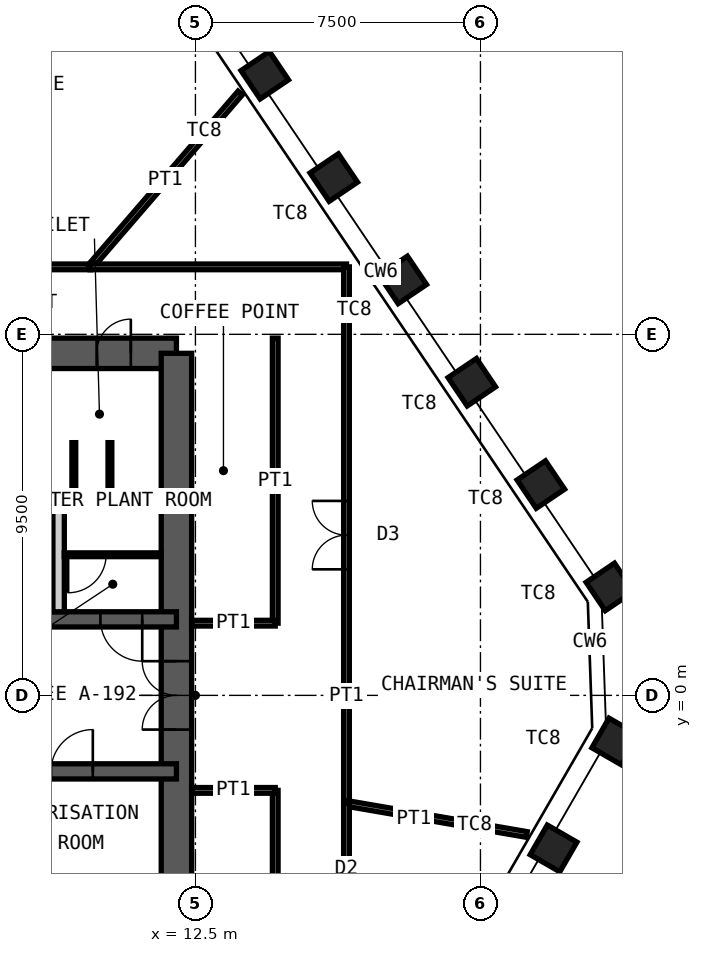
"""IFC4 building model, lengths in metres.
Left out: names, types, materials, properties, quantities, classifications, styles, units other than length and angle.
Written with IfcOpenShell. Run it as: python <this file> out.ifc"""

import sys

from ifc_helpers import new_model, si_unit, direction, frame, frame_2d, origin, origin_2d, place, context, subcontext, project, spatial, rectangle, hollow_rectangle, extrude, element, fill, save


model = new_model("IFC4")
c1 = context("Model", 3, precision=1e-05, world=origin(), true_north=direction((0.0, 1.0)))
c2 = subcontext(c1, "Body", "Model", "MODEL_VIEW")
j1 = project(units=[si_unit("LENGTHUNIT", "METRE"), si_unit("PLANEANGLEUNIT", "RADIAN")], contexts=[c1])
p1 = place(None, origin())
s1 = spatial("IfcSite", under=j1, at=p1, CompositionType="ELEMENT")
p2 = place(p1, origin())
s2 = spatial("IfcBuilding", under=s1, at=p2, CompositionType="ELEMENT")
p3 = place(p2, frame((0.0, 0.0, 333.4)))
s3 = spatial("IfcBuildingStorey", under=s2, at=p3, CompositionType="ELEMENT", Elevation=333.4)
for number, where, z_axis, x_axis in (
    (1, (14.324, 16.318, 0.0), (0.0, 0.0, 1.0), (-0.559, 0.829, 0.0)),
    (2, (16.141, 13.625, 0.0), (0.0, 0.0, 1.0), (-0.559, 0.829, 0.0)),
    (3, (17.957, 10.932, 0.0), (0.0, 0.0, 1.0), (-0.559, 0.829, 0.0)),
    (4, (19.773, 8.239, 0.0), (0.0, 0.0, 1.0), (-0.559, 0.829, 0.0)),
    (5, (21.589, 5.547, 0.0), (0.0, 0.0, 1.0), (-0.559, 0.829, 0.0)),
    (6, (23.406, 2.854, 0.0), (0.0, 0.0, 1.0), (-0.559, 0.829, 0.0)),
    (7, (23.548, -1.214, 0.0), (0.0, 0.0, 1.0), (0.5, 0.866, 0.0)),
    (8, (21.924, -4.027, 0.0), (0.0, 0.0, 1.0), (0.5, 0.866, 0.0)),
):
    element("IfcColumn", number, at=place(p3, frame(where, z_axis=z_axis, x_axis=x_axis)), inside=s3, PredefinedType="COLUMN", context=c2, shape_type="SweptSolid", body=[
        extrude(hollow_rectangle(XDim=0.9, YDim=0.9, WallThickness=0.05, at=origin_2d()), origin(), (0.0, 0.0, 1.0), 4.2),
    ])
p4 = place(p3, frame((-12.0, 9.0, 0.0), z_axis=(0.0, 0.0, 1.0), x_axis=(1.0, 0.0, 0.0)))
e9 = element("IfcWall", 9, at=p4, inside=s3, PredefinedType="SHEAR", context=c2, shape_type="SweptSolid", body=[
    extrude(rectangle(XDim=24.0, YDim=0.8, at=frame_2d((12.0, 0.0))), origin(), (0.0, 0.0, 1.0), 4.2),
])
p5 = place(p4, frame((10.4, 0.0, 0.0)))
e10 = element("IfcOpeningElement", 10, at=p5, cuts=e9, PredefinedType="OPENING", context=c2, shape_type="SweptSolid", body=[
    extrude(rectangle(XDim=1.0, YDim=2.1, at=frame_2d((0.5, 1.05))), frame((0.0, 0.41, 0.0), z_axis=(0.0, -1.0, 0.0), x_axis=(1.0, 0.0, 0.0)), (0.0, 0.0, 1.0), 0.82),
])
p6 = place(p4, frame((17.6, 0.0, 0.0)))
e11 = element("IfcOpeningElement", 11, at=p6, cuts=e9, PredefinedType="OPENING", context=c2, shape_type="SweptSolid", body=[
    extrude(rectangle(XDim=0.9, YDim=2.1, at=frame_2d((0.45, 1.05))), frame((0.0, 0.41, 0.0), z_axis=(0.0, -1.0, 0.0), x_axis=(1.0, 0.0, 0.0)), (0.0, 0.0, 1.0), 0.82),
])
p7 = place(p4, frame((21.9, 0.0, 0.0)))
e12 = element("IfcOpeningElement", 12, at=p7, cuts=e9, PredefinedType="OPENING", context=c2, shape_type="SweptSolid", body=[
    extrude(rectangle(XDim=0.9, YDim=2.1, at=frame_2d((0.45, 1.05))), frame((0.0, 0.41, 0.0), z_axis=(0.0, -1.0, 0.0), x_axis=(1.0, 0.0, 0.0)), (0.0, 0.0, 1.0), 0.82),
])
p8 = place(p3, frame((12.0, -9.0, 0.0), z_axis=(0.0, 0.0, 1.0), x_axis=(0.0, 1.0, 0.0)))
e13 = element("IfcWall", 13, at=p8, inside=s3, PredefinedType="SHEAR", context=c2, shape_type="SweptSolid", body=[
    extrude(rectangle(XDim=18.0, YDim=0.8, at=frame_2d((9.0, 0.0))), origin(), (0.0, 0.0, 1.0), 4.2),
])
p9 = place(p8, frame((8.1, 0.0, 0.0)))
e14 = element("IfcOpeningElement", 14, at=p9, cuts=e13, PredefinedType="OPENING", context=c2, shape_type="SweptSolid", body=[
    extrude(rectangle(XDim=1.8, YDim=2.1, at=frame_2d((0.9, 1.05))), frame((0.0, 0.41, 0.0), z_axis=(0.0, -1.0, 0.0), x_axis=(1.0, 0.0, 0.0)), (0.0, 0.0, 1.0), 0.82),
])
p10 = place(p3, frame((-12.0, 5.0, 0.0), z_axis=(0.0, 0.0, 1.0), x_axis=(1.0, 0.0, 0.0)))
e15 = element("IfcWall", 15, at=p10, inside=s3, PredefinedType="SHEAR", context=c2, shape_type="SweptSolid", body=[
    extrude(rectangle(XDim=24.0, YDim=0.3, at=frame_2d((12.0, 0.0))), origin(), (0.0, 0.0, 1.0), 4.2),
])
p11 = place(p3, frame((-12.0, 2.0, 0.0), z_axis=(0.0, 0.0, 1.0), x_axis=(1.0, 0.0, 0.0)))
e16 = element("IfcWall", 16, at=p11, inside=s3, PredefinedType="SHEAR", context=c2, shape_type="SweptSolid", body=[
    extrude(rectangle(XDim=24.0, YDim=0.4, at=frame_2d((12.0, 0.0))), origin(), (0.0, 0.0, 1.0), 4.2),
])
p12 = place(p11, frame((2.4, 0.0, 0.0)))
e17 = element("IfcOpeningElement", 17, at=p12, cuts=e16, PredefinedType="OPENING", context=c2, shape_type="SweptSolid", body=[
    extrude(rectangle(XDim=1.1, YDim=2.1, at=frame_2d((0.55, 1.05))), frame((0.0, 0.21, 0.0), z_axis=(0.0, -1.0, 0.0), x_axis=(1.0, 0.0, 0.0)), (0.0, 0.0, 1.0), 0.42),
])
p13 = place(p11, frame((22.0, 0.0, 0.0)))
e18 = element("IfcOpeningElement", 18, at=p13, cuts=e16, PredefinedType="OPENING", context=c2, shape_type="SweptSolid", body=[
    extrude(rectangle(XDim=1.1, YDim=2.1, at=frame_2d((0.55, 1.05))), frame((0.0, 0.21, 0.0), z_axis=(0.0, -1.0, 0.0), x_axis=(1.0, 0.0, 0.0)), (0.0, 0.0, 1.0), 0.42),
])
p14 = place(p11, frame((10.15, 0.0, 0.0)))
e19 = element("IfcOpeningElement", 19, at=p14, cuts=e16, PredefinedType="OPENING", context=c2, shape_type="SweptSolid", body=[
    extrude(rectangle(XDim=1.0, YDim=2.1, at=frame_2d((0.5, 1.05))), frame((0.0, 0.21, 0.0), z_axis=(0.0, -1.0, 0.0), x_axis=(1.0, 0.0, 0.0)), (0.0, 0.0, 1.0), 0.42),
])
p15 = place(p11, frame((6.9, 0.0, 0.0)))
e20 = element("IfcOpeningElement", 20, at=p15, cuts=e16, PredefinedType="OPENING", context=c2, shape_type="SweptSolid", body=[
    extrude(rectangle(XDim=1.0, YDim=2.1, at=frame_2d((0.5, 1.05))), frame((0.0, 0.21, 0.0), z_axis=(0.0, -1.0, 0.0), x_axis=(1.0, 0.0, 0.0)), (0.0, 0.0, 1.0), 0.42),
])
p16 = place(p11, frame((13.35, 0.0, 0.0)))
e21 = element("IfcOpeningElement", 21, at=p16, cuts=e16, PredefinedType="OPENING", context=c2, shape_type="SweptSolid", body=[
    extrude(rectangle(XDim=1.1, YDim=2.4, at=frame_2d((0.55, 1.2))), frame((0.0, 0.21, 0.0), z_axis=(0.0, -1.0, 0.0), x_axis=(1.0, 0.0, 0.0)), (0.0, 0.0, 1.0), 0.42),
])
p17 = place(p11, frame((16.15, 0.0, 0.0)))
e22 = element("IfcOpeningElement", 22, at=p17, cuts=e16, PredefinedType="OPENING", context=c2, shape_type="SweptSolid", body=[
    extrude(rectangle(XDim=1.1, YDim=2.4, at=frame_2d((0.55, 1.2))), frame((0.0, 0.21, 0.0), z_axis=(0.0, -1.0, 0.0), x_axis=(1.0, 0.0, 0.0)), (0.0, 0.0, 1.0), 0.42),
])
p18 = place(p11, frame((19.0, 0.0, 0.0)))
e23 = element("IfcOpeningElement", 23, at=p18, cuts=e16, PredefinedType="OPENING", context=c2, shape_type="SweptSolid", body=[
    extrude(rectangle(XDim=1.0, YDim=2.1, at=frame_2d((0.5, 1.05))), frame((0.0, 0.21, 0.0), z_axis=(0.0, -1.0, 0.0), x_axis=(1.0, 0.0, 0.0)), (0.0, 0.0, 1.0), 0.42),
])
p19 = place(p3, frame((-12.0, -2.0, 0.0), z_axis=(0.0, 0.0, 1.0), x_axis=(1.0, 0.0, 0.0)))
e24 = element("IfcWall", 24, at=p19, inside=s3, PredefinedType="SHEAR", context=c2, shape_type="SweptSolid", body=[
    extrude(rectangle(XDim=24.0, YDim=0.4, at=frame_2d((12.0, 0.0))), origin(), (0.0, 0.0, 1.0), 4.2),
])
p20 = place(p19, frame((1.1, 0.0, 0.0)))
e25 = element("IfcOpeningElement", 25, at=p20, cuts=e24, PredefinedType="OPENING", context=c2, shape_type="SweptSolid", body=[
    extrude(rectangle(XDim=1.1, YDim=2.1, at=frame_2d((0.55, 1.05))), frame((0.0, 0.21, 0.0), z_axis=(0.0, -1.0, 0.0), x_axis=(1.0, 0.0, 0.0)), (0.0, 0.0, 1.0), 0.42),
])
p21 = place(p19, frame((13.55, 0.0, 0.0)))
e26 = element("IfcOpeningElement", 26, at=p21, cuts=e24, PredefinedType="OPENING", context=c2, shape_type="SweptSolid", body=[
    extrude(rectangle(XDim=1.1, YDim=2.1, at=frame_2d((0.55, 1.05))), frame((0.0, 0.21, 0.0), z_axis=(0.0, -1.0, 0.0), x_axis=(1.0, 0.0, 0.0)), (0.0, 0.0, 1.0), 0.42),
])
p22 = place(p19, frame((20.7, 0.0, 0.0)))
e27 = element("IfcOpeningElement", 27, at=p22, cuts=e24, PredefinedType="OPENING", context=c2, shape_type="SweptSolid", body=[
    extrude(rectangle(XDim=1.1, YDim=2.1, at=frame_2d((0.55, 1.05))), frame((0.0, 0.21, 0.0), z_axis=(0.0, -1.0, 0.0), x_axis=(1.0, 0.0, 0.0)), (0.0, 0.0, 1.0), 0.42),
])
p23 = place(p19, frame((4.0, 0.0, 0.0)))
e28 = element("IfcOpeningElement", 28, at=p23, cuts=e24, PredefinedType="OPENING", context=c2, shape_type="SweptSolid", body=[
    extrude(rectangle(XDim=1.0, YDim=2.1, at=frame_2d((0.5, 1.05))), frame((0.0, 0.21, 0.0), z_axis=(0.0, -1.0, 0.0), x_axis=(1.0, 0.0, 0.0)), (0.0, 0.0, 1.0), 0.42),
])
p24 = place(p19, frame((6.8, 0.0, 0.0)))
e29 = element("IfcOpeningElement", 29, at=p24, cuts=e24, PredefinedType="OPENING", context=c2, shape_type="SweptSolid", body=[
    extrude(rectangle(XDim=1.0, YDim=2.1, at=frame_2d((0.5, 1.05))), frame((0.0, 0.21, 0.0), z_axis=(0.0, -1.0, 0.0), x_axis=(1.0, 0.0, 0.0)), (0.0, 0.0, 1.0), 0.42),
])
p25 = place(p19, frame((9.6, 0.0, 0.0)))
e30 = element("IfcOpeningElement", 30, at=p25, cuts=e24, PredefinedType="OPENING", context=c2, shape_type="SweptSolid", body=[
    extrude(rectangle(XDim=1.0, YDim=2.1, at=frame_2d((0.5, 1.05))), frame((0.0, 0.21, 0.0), z_axis=(0.0, -1.0, 0.0), x_axis=(1.0, 0.0, 0.0)), (0.0, 0.0, 1.0), 0.42),
])
p26 = place(p3, frame((8.9, 2.2, 0.0), z_axis=(0.0, 0.0, 1.0), x_axis=(0.0, 1.0, 0.0)))
e31 = element("IfcWall", 31, at=p26, inside=s3, PredefinedType="PARTITIONING", context=c2, shape_type="SweptSolid", body=[
    extrude(rectangle(XDim=2.65, YDim=0.3, at=frame_2d((1.325, 0.0))), origin(), (0.0, 0.0, 1.0), 3.98),
])
p27 = place(p3, frame((9.05, 3.7, 0.0), z_axis=(0.0, 0.0, 1.0), x_axis=(1.0, 0.0, 0.0)))
e32 = element("IfcWall", 32, at=p27, inside=s3, PredefinedType="PARTITIONING", context=c2, shape_type="SweptSolid", body=[
    extrude(rectangle(XDim=2.55, YDim=0.1, at=frame_2d((1.275, 0.0))), origin(), (0.0, 0.0, 1.0), 3.98),
])
p28 = place(p27, frame((0.1, 0.0, 0.0)))
e33 = element("IfcOpeningElement", 33, at=p28, cuts=e32, PredefinedType="OPENING", context=c2, shape_type="SweptSolid", body=[
    extrude(rectangle(XDim=1.0, YDim=2.4, at=frame_2d((0.5, 1.2))), frame((0.0, 0.06, 0.0), z_axis=(0.0, -1.0, 0.0), x_axis=(1.0, 0.0, 0.0)), (0.0, 0.0, 1.0), 0.12),
])
for number, where, z_axis, x_axis in (
    (34, (9.3, 5.15, 0.0), (0.0, 0.0, 1.0), (0.0, 1.0, 0.0)),
    (35, (10.25, 5.15, 0.0), (0.0, 0.0, 1.0), (0.0, 1.0, 0.0)),
):
    element("IfcWall", number, at=place(p3, frame(where, z_axis=z_axis, x_axis=x_axis)), inside=s3, PredefinedType="PARTITIONING", context=c2, shape_type="SweptSolid", body=[
        extrude(rectangle(XDim=1.5, YDim=0.1, at=frame_2d((0.75, 0.0))), origin(), (0.0, 0.0, 1.0), 2.1),
    ])
p29 = place(p3, frame((1.261, 11.275, 0.0), z_axis=(0.0, 0.0, 1.0), x_axis=(1.0, 0.0, 0.0)))
e36 = element("IfcWall", 36, at=p29, inside=s3, PredefinedType="PARTITIONING", context=c2, shape_type="SweptSolid", body=[
    extrude(rectangle(XDim=8.469, YDim=0.15, at=frame_2d((4.235, 0.0))), origin(), (0.0, 0.0, 1.0), 3.92),
])
p30 = place(p29, frame((3.335, 0.0, 0.0)))
e37 = element("IfcOpeningElement", 37, at=p30, cuts=e36, PredefinedType="OPENING", context=c2, shape_type="SweptSolid", body=[
    extrude(rectangle(XDim=1.8, YDim=2.4, at=frame_2d((0.9, 1.2))), frame((0.0, 0.085, 0.0), z_axis=(0.0, -1.0, 0.0), x_axis=(1.0, 0.0, 0.0)), (0.0, 0.0, 1.0), 0.17),
])
p31 = place(p3, frame((13.678, 15.85, 0.0), z_axis=(0.0, 0.0, 1.0), x_axis=(-0.65333269737, -0.757070925704, 0.0)))
e38 = element("IfcWall", 38, at=p31, inside=s3, PredefinedType="PARTITIONING", context=c2, shape_type="SweptSolid", body=[
    extrude(rectangle(XDim=6.044, YDim=0.15, at=frame_2d((3.022, 0.0))), origin(), (0.0, 0.0, 1.0), 2.72),
])
p32 = place(p3, frame((9.73, 11.275, 0.0), z_axis=(0.0, 0.0, 1.0), x_axis=(1.0, 0.0, 0.0)))
e39 = element("IfcWall", 39, at=p32, inside=s3, PredefinedType="PARTITIONING", context=c2, shape_type="SweptSolid", body=[
    extrude(rectangle(XDim=6.745, YDim=0.15, at=frame_2d((3.373, 0.0))), origin(), (0.0, 0.0, 1.0), 3.92),
])
p33 = place(p3, frame((16.475, 11.275, 0.0), z_axis=(0.0, 0.0, 1.0), x_axis=(0.0, -1.0, 0.0)))
e40 = element("IfcWall", 40, at=p33, inside=s3, PredefinedType="PARTITIONING", context=c2, shape_type="SweptSolid", body=[
    extrude(rectangle(XDim=14.117, YDim=0.15, at=frame_2d((7.058, 0.0))), origin(), (0.0, 0.0, 1.0), 3.92),
])
p34 = place(p33, frame((6.158, 0.0, 0.0)))
e41 = element("IfcOpeningElement", 41, at=p34, cuts=e40, PredefinedType="OPENING", context=c2, shape_type="SweptSolid", body=[
    extrude(rectangle(XDim=1.8, YDim=2.4, at=frame_2d((0.9, 1.2))), frame((0.0, 0.085, 0.0), z_axis=(0.0, -1.0, 0.0), x_axis=(1.0, 0.0, 0.0)), (0.0, 0.0, 1.0), 0.17),
])
p35 = place(p3, frame((21.219, -3.66, 0.0), z_axis=(0.0, 0.0, 1.0), x_axis=(-0.985444592587, 0.16999692627, 0.0)))
e42 = element("IfcWall", 42, at=p35, inside=s3, PredefinedType="PARTITIONING", context=c2, shape_type="SweptSolid", body=[
    extrude(rectangle(XDim=4.814, YDim=0.15, at=frame_2d((2.407, 0.0))), origin(), (0.0, 0.0, 1.0), 3.02),
])
p36 = place(p3, frame((16.475, -2.842, 0.0), z_axis=(0.0, 0.0, 1.0), x_axis=(0.0, -1.0, 0.0)))
e43 = element("IfcWall", 43, at=p36, inside=s3, PredefinedType="PARTITIONING", context=c2, shape_type="SweptSolid", body=[
    extrude(rectangle(XDim=5.64, YDim=0.15, at=frame_2d((2.82, 0.0))), origin(), (0.0, 0.0, 1.0), 3.92),
])
p37 = place(p36, frame((2.32, 0.0, 0.0)))
e44 = element("IfcOpeningElement", 44, at=p37, cuts=e43, PredefinedType="OPENING", context=c2, shape_type="SweptSolid", body=[
    extrude(rectangle(XDim=1.0, YDim=2.4, at=frame_2d((0.5, 1.2))), frame((0.0, 0.085, 0.0), z_axis=(0.0, -1.0, 0.0), x_axis=(1.0, 0.0, 0.0)), (0.0, 0.0, 1.0), 0.17),
])
p38 = place(p3, frame((14.6, 1.9, 0.0), z_axis=(0.0, 0.0, 1.0), x_axis=(0.0, 1.0, 0.0)))
e45 = element("IfcWall", 45, at=p38, inside=s3, PredefinedType="PARTITIONING", context=c2, shape_type="SweptSolid", body=[
    extrude(rectangle(XDim=7.5, YDim=0.15, at=frame_2d((3.75, 0.0))), origin(), (0.0, 0.0, 1.0), 3.92),
])
p39 = place(p3, frame((12.4, 1.9, 0.0), z_axis=(0.0, 0.0, 1.0), x_axis=(1.0, 0.0, 0.0)))
e46 = element("IfcWall", 46, at=p39, inside=s3, PredefinedType="PARTITIONING", context=c2, shape_type="SweptSolid", body=[
    extrude(rectangle(XDim=2.2, YDim=0.15, at=frame_2d((1.1, 0.0))), origin(), (0.0, 0.0, 1.0), 2.72),
])
p40 = place(p3, frame((14.6, -9.4, 0.0), z_axis=(0.0, 0.0, 1.0), x_axis=(0.0, 1.0, 0.0)))
e47 = element("IfcWall", 47, at=p40, inside=s3, PredefinedType="PARTITIONING", context=c2, shape_type="SweptSolid", body=[
    extrude(rectangle(XDim=6.9, YDim=0.15, at=frame_2d((3.45, 0.0))), origin(), (0.0, 0.0, 1.0), 3.92),
])
p41 = place(p3, frame((12.4, -2.5, 0.0), z_axis=(0.0, 0.0, 1.0), x_axis=(1.0, 0.0, 0.0)))
e48 = element("IfcWall", 48, at=p41, inside=s3, PredefinedType="PARTITIONING", context=c2, shape_type="SweptSolid", body=[
    extrude(rectangle(XDim=2.2, YDim=0.15, at=frame_2d((1.1, 0.0))), origin(), (0.0, 0.0, 1.0), 3.02),
])
p42 = place(p7, origin())
e49 = element("IfcDoor", 49, at=p42, inside=s3, OperationType="SINGLE_SWING_LEFT", PredefinedType="DOOR", context=c2, shape_type="SweptSolid", body=[
    extrude(rectangle(XDim=0.9, YDim=2.1, at=frame_2d((0.45, 1.05))), frame((0.0, 0.025, 0.0), z_axis=(0.0, -1.0, 0.0), x_axis=(1.0, 0.0, 0.0)), (0.0, 0.0, 1.0), 0.05),
])
fill(e12, e49)
p43 = place(p13, origin())
e50 = element("IfcDoor", 50, at=p43, inside=s3, OperationType="SINGLE_SWING_RIGHT", PredefinedType="DOOR", context=c2, shape_type="SweptSolid", body=[
    extrude(rectangle(XDim=1.1, YDim=2.1, at=frame_2d((0.55, 1.05))), frame((0.0, 0.025, 0.0), z_axis=(0.0, -1.0, 0.0), x_axis=(1.0, 0.0, 0.0)), (0.0, 0.0, 1.0), 0.05),
])
fill(e18, e50)
p44 = place(p22, origin())
e51 = element("IfcDoor", 51, at=p44, inside=s3, OperationType="SINGLE_SWING_LEFT", PredefinedType="DOOR", context=c2, shape_type="SweptSolid", body=[
    extrude(rectangle(XDim=1.1, YDim=2.1, at=frame_2d((0.55, 1.05))), frame((0.0, 0.025, 0.0), z_axis=(0.0, -1.0, 0.0), x_axis=(1.0, 0.0, 0.0)), (0.0, 0.0, 1.0), 0.05),
])
fill(e27, e51)
p45 = place(p9, origin())
e52 = element("IfcDoor", 52, at=p45, inside=s3, OperationType="DOUBLE_DOOR_DOUBLE_SWING", PredefinedType="DOOR", context=c2, shape_type="SweptSolid", body=[
    extrude(rectangle(XDim=1.8, YDim=2.1, at=frame_2d((0.9, 1.05))), frame((0.0, 0.025, 0.0), z_axis=(0.0, -1.0, 0.0), x_axis=(1.0, 0.0, 0.0)), (0.0, 0.0, 1.0), 0.05),
])
fill(e14, e52)
p46 = place(p28, origin())
e53 = element("IfcDoor", 53, at=p46, inside=s3, OperationType="SINGLE_SWING_LEFT", PredefinedType="DOOR", context=c2, shape_type="SweptSolid", body=[
    extrude(rectangle(XDim=1.0, YDim=2.4, at=frame_2d((0.5, 1.2))), frame((0.0, 0.025, 0.0), z_axis=(0.0, -1.0, 0.0), x_axis=(1.0, 0.0, 0.0)), (0.0, 0.0, 1.0), 0.05),
])
fill(e33, e53)
p47 = place(p34, origin())
e54 = element("IfcDoor", 54, at=p47, inside=s3, OperationType="DOUBLE_DOOR_DOUBLE_SWING", PredefinedType="DOOR", context=c2, shape_type="SweptSolid", body=[
    extrude(rectangle(XDim=1.8, YDim=2.4, at=frame_2d((0.9, 1.2))), frame((0.0, 0.025, 0.0), z_axis=(0.0, -1.0, 0.0), x_axis=(1.0, 0.0, 0.0)), (0.0, 0.0, 1.0), 0.05),
])
fill(e41, e54)
save(model, sys.argv[1])
